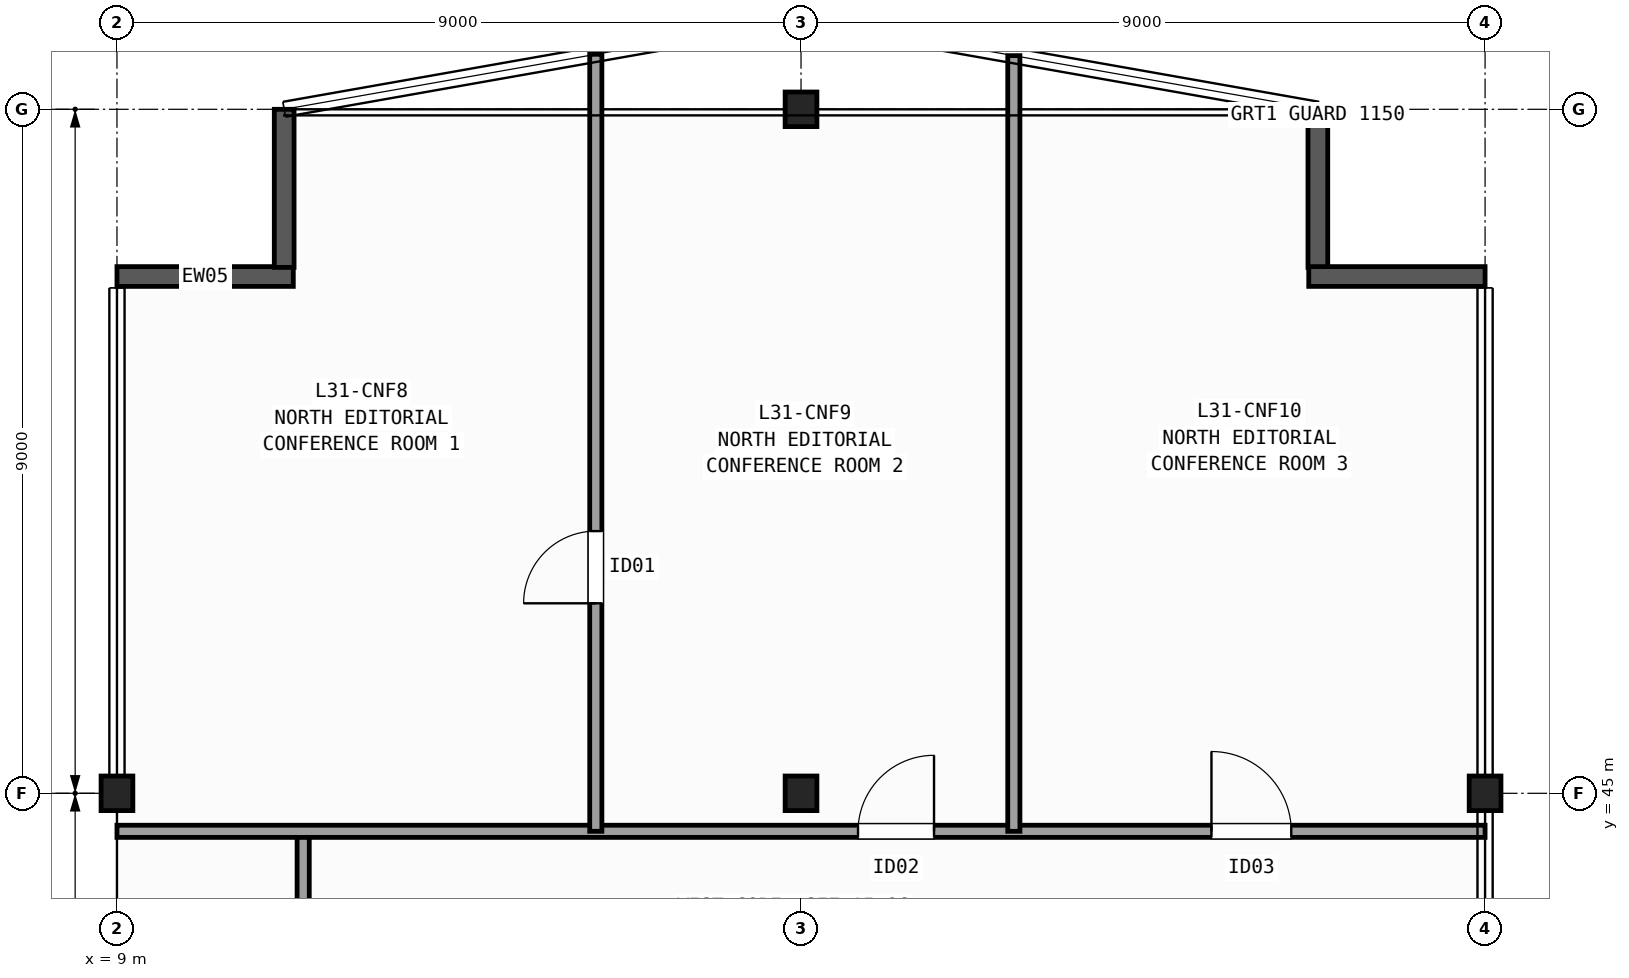
"""IFC4 building model, lengths in metres.
Left out: names, types, materials, properties, quantities, classifications, styles, units other than length and angle.
Written with IfcOpenShell. Run it as: python <this file> out.ifc"""

import sys

from ifc_helpers import new_model, si_unit, direction, frame, frame_2d, origin, origin_2d, place, context, subcontext, project, spatial, rectangle, i_section, extrude, element, fill, save


model = new_model("IFC4")
c1 = context("Model", 3, precision=1e-05, world=origin(), true_north=direction((0.0, 1.0)))
c2 = subcontext(c1, "Body", "Model", "MODEL_VIEW")
j1 = project(units=[si_unit("LENGTHUNIT", "METRE"), si_unit("PLANEANGLEUNIT", "RADIAN")], contexts=[c1])
p1 = place(None, origin())
s1 = spatial("IfcSite", under=j1, at=p1, CompositionType="ELEMENT")
p2 = place(p1, origin())
s2 = spatial("IfcBuilding", under=s1, at=p2, CompositionType="ELEMENT")
p3 = place(p2, frame((0.0, 0.0, 128.5)))
s3 = spatial("IfcBuildingStorey", under=s2, at=p3, CompositionType="ELEMENT", Elevation=128.5)
for number, where, z_axis, x_axis in (
    (1, (9.0, 45.0, 0.0), (0.0, 0.0, 1.0), (1.0, 0.0, 0.0)),
    (2, (18.0, 45.0, 0.0), (0.0, 0.0, 1.0), (1.0, 0.0, 0.0)),
    (3, (18.0, 54.0, 0.0), (0.0, 0.0, 1.0), (1.0, 0.0, 0.0)),
    (4, (27.0, 45.0, 0.0), (0.0, 0.0, 1.0), (1.0, 0.0, 0.0)),
):
    element("IfcColumn", number, at=place(p3, frame(where, z_axis=z_axis, x_axis=x_axis)), inside=s3, PredefinedType="COLUMN", context=c2, shape_type="SweptSolid", body=[
        extrude(i_section(OverallWidth=0.418, OverallDepth=0.455, WebThickness=0.042, FlangeThickness=0.068, FilletRadius=0.015, at=origin_2d()), origin(), (0.0, 0.0, 1.0), 3.7),
    ])
p4 = place(p3, frame((9.0, 51.8, 0.0), z_axis=(0.0, 0.0, 1.0), x_axis=(1.0, 0.0, 0.0)))
e5 = element("IfcWall", 5, at=p4, inside=s3, PredefinedType="SOLIDWALL", context=c2, shape_type="SweptSolid", body=[
    extrude(rectangle(XDim=2.32, YDim=0.26, at=frame_2d((1.16, 0.0))), origin(), (0.0, 0.0, 1.0), 3.42),
])
for number, where, z_axis, x_axis in (
    (6, (11.2, 51.92, 0.0), (0.0, 0.0, 1.0), (0.0, 1.0, 0.0)),
    (7, (24.8, 54.0, 0.0), (0.0, 0.0, 1.0), (0.0, -1.0, 0.0)),
):
    element("IfcWall", number, at=place(p3, frame(where, z_axis=z_axis, x_axis=x_axis)), inside=s3, PredefinedType="SOLIDWALL", context=c2, shape_type="SweptSolid", body=[
        extrude(rectangle(XDim=2.08, YDim=0.26, at=frame_2d((1.04, 0.0))), origin(), (0.0, 0.0, 1.0), 3.42),
    ])
p5 = place(p3, frame((24.68, 51.8, 0.0), z_axis=(0.0, 0.0, 1.0), x_axis=(1.0, 0.0, 0.0)))
e8 = element("IfcWall", 8, at=p5, inside=s3, PredefinedType="SOLIDWALL", context=c2, shape_type="SweptSolid", body=[
    extrude(rectangle(XDim=2.32, YDim=0.26, at=frame_2d((1.16, 0.0))), origin(), (0.0, 0.0, 1.0), 3.42),
])
p6 = place(p3, frame((11.45, 42.4, 0.0), z_axis=(0.0, 0.0, 1.0), x_axis=(0.0, 1.0, 0.0)))
e9 = element("IfcWall", 9, at=p6, inside=s3, PredefinedType="PARTITIONING", context=c2, shape_type="SweptSolid", body=[
    extrude(rectangle(XDim=2.1, YDim=0.16, at=frame_2d((1.05, 0.0))), origin(), (0.0, 0.0, 1.0), 3.42),
])
p7 = place(p3, frame((9.0, 44.5, 0.0), z_axis=(0.0, 0.0, 1.0), x_axis=(1.0, 0.0, 0.0)))
e10 = element("IfcWall", 10, at=p7, inside=s3, PredefinedType="PARTITIONING", context=c2, shape_type="SweptSolid", body=[
    extrude(rectangle(XDim=18.0, YDim=0.16, at=frame_2d((9.0, 0.0))), origin(), (0.0, 0.0, 1.0), 2.634),
])
p8 = place(p7, frame((9.75, 0.0, 0.0)))
e11 = element("IfcOpeningElement", 11, at=p8, cuts=e10, PredefinedType="OPENING", context=c2, shape_type="SweptSolid", body=[
    extrude(rectangle(XDim=1.0, YDim=2.1, at=frame_2d((0.5, 1.05))), frame((0.0, 0.09, 0.0), z_axis=(0.0, -1.0, 0.0), x_axis=(1.0, 0.0, 0.0)), (0.0, 0.0, 1.0), 0.18),
])
p9 = place(p7, frame((14.4, 0.0, 0.0)))
e12 = element("IfcOpeningElement", 12, at=p9, cuts=e10, PredefinedType="OPENING", context=c2, shape_type="SweptSolid", body=[
    extrude(rectangle(XDim=1.05, YDim=2.15, at=frame_2d((0.525, 1.075))), frame((0.0, 0.09, 0.0), z_axis=(0.0, -1.0, 0.0), x_axis=(1.0, 0.0, 0.0)), (0.0, 0.0, 1.0), 0.18),
])
p10 = place(p3, frame((15.3, 44.5, 0.0), z_axis=(0.0, 0.0, 1.0), x_axis=(0.0, 1.0, 0.0)))
e13 = element("IfcWall", 13, at=p10, inside=s3, PredefinedType="PARTITIONING", context=c2, shape_type="SweptSolid", body=[
    extrude(rectangle(XDim=10.224, YDim=0.16, at=frame_2d((5.112, 0.0))), origin(), (0.0, 0.0, 1.0), 3.42),
])
p11 = place(p10, frame((3.0, 0.0, 0.0)))
e14 = element("IfcOpeningElement", 14, at=p11, cuts=e13, PredefinedType="OPENING", context=c2, shape_type="SweptSolid", body=[
    extrude(rectangle(XDim=0.95, YDim=2.1, at=frame_2d((0.475, 1.05))), frame((0.0, 0.09, 0.0), z_axis=(0.0, -1.0, 0.0), x_axis=(1.0, 0.0, 0.0)), (0.0, 0.0, 1.0), 0.18),
])
p12 = place(p3, frame((20.8, 44.5, 0.0), z_axis=(0.0, 0.0, 1.0), x_axis=(0.0, 1.0, 0.0)))
e15 = element("IfcWall", 15, at=p12, inside=s3, PredefinedType="PARTITIONING", context=c2, shape_type="SweptSolid", body=[
    extrude(rectangle(XDim=10.206, YDim=0.16, at=frame_2d((5.103, 0.0))), origin(), (0.0, 0.0, 1.0), 3.42),
])
p13 = place(p11, origin())
e16 = element("IfcDoor", 16, at=p13, inside=s3, OperationType="SINGLE_SWING_LEFT", PredefinedType="DOOR", context=c2, shape_type="SweptSolid", body=[
    extrude(rectangle(XDim=0.95, YDim=2.1, at=frame_2d((0.475, 1.05))), frame((0.0, 0.025, 0.0), z_axis=(0.0, -1.0, 0.0), x_axis=(1.0, 0.0, 0.0)), (0.0, 0.0, 1.0), 0.05),
])
fill(e14, e16)
p14 = place(p8, origin())
e17 = element("IfcDoor", 17, at=p14, inside=s3, OperationType="SINGLE_SWING_RIGHT", PredefinedType="DOOR", context=c2, shape_type="SweptSolid", body=[
    extrude(rectangle(XDim=1.0, YDim=2.1, at=frame_2d((0.5, 1.05))), frame((0.0, 0.025, 0.0), z_axis=(0.0, -1.0, 0.0), x_axis=(1.0, 0.0, 0.0)), (0.0, 0.0, 1.0), 0.05),
])
fill(e11, e17)
p15 = place(p9, origin())
e18 = element("IfcDoor", 18, at=p15, inside=s3, OperationType="SINGLE_SWING_LEFT", PredefinedType="DOOR", context=c2, shape_type="SweptSolid", body=[
    extrude(rectangle(XDim=1.05, YDim=2.15, at=frame_2d((0.525, 1.075))), frame((0.0, 0.025, 0.0), z_axis=(0.0, -1.0, 0.0), x_axis=(1.0, 0.0, 0.0)), (0.0, 0.0, 1.0), 0.05),
])
fill(e12, e18)
save(model, sys.argv[1])
